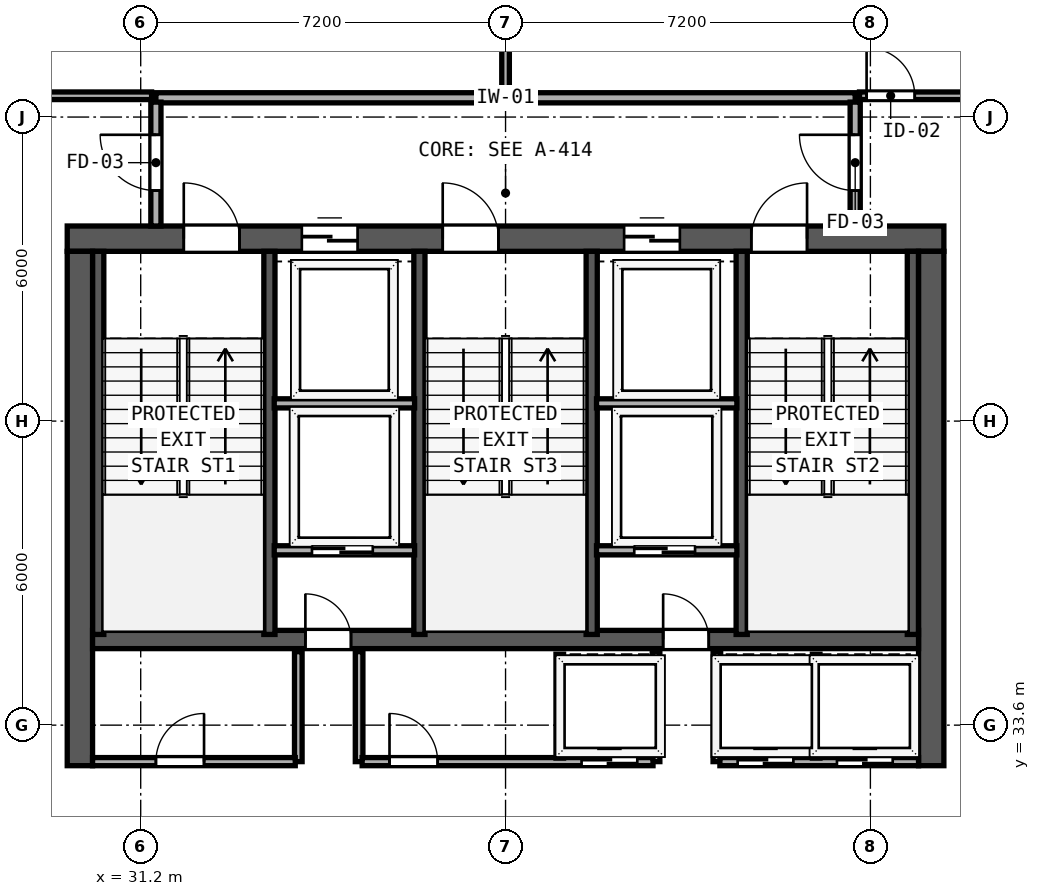
"""IFC4 building model, lengths in metres.
Left out: names, types, materials, properties, quantities, classifications, styles, units other than length and angle.
Written with IfcOpenShell. Run it as: python <this file> out.ifc"""

import sys

from ifc_helpers import new_model, si_unit, direction, frame, frame_2d, origin, place, context, subcontext, project, spatial, rectangle, extrude, element, fill, save


model = new_model("IFC4")
c1 = context("Model", 3, precision=1e-05, world=origin(), true_north=direction((0.0, 1.0)))
c2 = subcontext(c1, "Body", "Model", "MODEL_VIEW")
j1 = project(units=[si_unit("LENGTHUNIT", "METRE"), si_unit("PLANEANGLEUNIT", "RADIAN")], contexts=[c1])
p1 = place(None, origin())
s1 = spatial("IfcSite", under=j1, at=p1, CompositionType="ELEMENT")
p2 = place(p1, origin())
s2 = spatial("IfcBuilding", under=s1, at=p2, CompositionType="ELEMENT")
p3 = place(p2, frame((0.0, 0.0, 282.2)))
s3 = spatial("IfcBuildingStorey", under=s2, at=p3, CompositionType="ELEMENT", Elevation=282.2)
p4 = place(p3, frame((29.75, 43.2, 0.0), z_axis=(0.0, 0.0, 1.0), x_axis=(1.0, 0.0, 0.0)))
e1 = element("IfcWall", 1, at=p4, inside=s3, PredefinedType="SHEAR", context=c2, shape_type="SweptSolid", body=[
    extrude(rectangle(XDim=17.3, YDim=0.5, at=frame_2d((8.65, 0.0))), origin(), (0.0, 0.0, 1.0), 3.72),
])
p5 = place(p4, frame((2.3, 0.0, 0.0)))
e2 = element("IfcOpeningElement", 2, at=p5, cuts=e1, PredefinedType="OPENING", context=c2, shape_type="SweptSolid", body=[
    extrude(rectangle(XDim=1.1, YDim=2.15, at=frame_2d((0.55, 1.075))), frame((0.0, 0.26, 0.0), z_axis=(0.0, -1.0, 0.0), x_axis=(1.0, 0.0, 0.0)), (0.0, 0.0, 1.0), 0.52),
])
p6 = place(p4, frame((7.41, 0.0, 0.0)))
e3 = element("IfcOpeningElement", 3, at=p6, cuts=e1, PredefinedType="OPENING", context=c2, shape_type="SweptSolid", body=[
    extrude(rectangle(XDim=1.1, YDim=2.15, at=frame_2d((0.55, 1.075))), frame((0.0, 0.26, 0.0), z_axis=(0.0, -1.0, 0.0), x_axis=(1.0, 0.0, 0.0)), (0.0, 0.0, 1.0), 0.52),
])
p7 = place(p4, frame((13.5, 0.0, 0.0)))
e4 = element("IfcOpeningElement", 4, at=p7, cuts=e1, PredefinedType="OPENING", context=c2, shape_type="SweptSolid", body=[
    extrude(rectangle(XDim=1.1, YDim=2.15, at=frame_2d((0.55, 1.075))), frame((0.0, 0.26, 0.0), z_axis=(0.0, -1.0, 0.0), x_axis=(1.0, 0.0, 0.0)), (0.0, 0.0, 1.0), 0.52),
])
p8 = place(p4, frame((4.63, 0.0, 0.0)))
e5 = element("IfcOpeningElement", 5, at=p8, cuts=e1, PredefinedType="OPENING", context=c2, shape_type="SweptSolid", body=[
    extrude(rectangle(XDim=1.1, YDim=2.2, at=frame_2d((0.55, 1.1))), frame((0.0, 0.26, 0.0), z_axis=(0.0, -1.0, 0.0), x_axis=(1.0, 0.0, 0.0)), (0.0, 0.0, 1.0), 0.52),
])
p9 = place(p4, frame((10.99, 0.0, 0.0)))
e6 = element("IfcOpeningElement", 6, at=p9, cuts=e1, PredefinedType="OPENING", context=c2, shape_type="SweptSolid", body=[
    extrude(rectangle(XDim=1.1, YDim=2.2, at=frame_2d((0.55, 1.1))), frame((0.0, 0.26, 0.0), z_axis=(0.0, -1.0, 0.0), x_axis=(1.0, 0.0, 0.0)), (0.0, 0.0, 1.0), 0.52),
])
for number, where, z_axis, x_axis in (
    (7, (30.0, 32.8, 0.0), (0.0, 0.0, 1.0), (0.0, 1.0, 0.0)),
    (8, (46.8, 32.8, 0.0), (0.0, 0.0, 1.0), (0.0, 1.0, 0.0)),
):
    element("IfcWall", number, at=place(p3, frame(where, z_axis=z_axis, x_axis=x_axis)), inside=s3, PredefinedType="SHEAR", context=c2, shape_type="SweptSolid", body=[
        extrude(rectangle(XDim=10.15, YDim=0.5, at=frame_2d((5.075, 0.0))), origin(), (0.0, 0.0, 1.0), 3.72),
    ])
p10 = place(p3, frame((30.25, 35.29, 0.0), z_axis=(0.0, 0.0, 1.0), x_axis=(1.0, 0.0, 0.0)))
e9 = element("IfcWall", 9, at=p10, inside=s3, PredefinedType="SHEAR", context=c2, shape_type="SweptSolid", body=[
    extrude(rectangle(XDim=16.3, YDim=0.36, at=frame_2d((8.15, 0.0))), origin(), (0.0, 0.0, 1.0), 3.72),
])
p11 = place(p10, frame((5.1, 0.0, 0.0), z_axis=(0.0, 0.0, 1.0), x_axis=(-1.0, 0.0, 0.0)))
e10 = element("IfcOpeningElement", 10, at=p11, cuts=e9, PredefinedType="OPENING", context=c2, shape_type="SweptSolid", body=[
    extrude(rectangle(XDim=0.9, YDim=2.1, at=frame_2d((0.45, 1.05))), frame((0.0, 0.19, 0.0), z_axis=(0.0, -1.0, 0.0), x_axis=(1.0, 0.0, 0.0)), (0.0, 0.0, 1.0), 0.38),
])
p12 = place(p10, frame((12.16, 0.0, 0.0), z_axis=(0.0, 0.0, 1.0), x_axis=(-1.0, 0.0, 0.0)))
e11 = element("IfcOpeningElement", 11, at=p12, cuts=e9, PredefinedType="OPENING", context=c2, shape_type="SweptSolid", body=[
    extrude(rectangle(XDim=0.9, YDim=2.1, at=frame_2d((0.45, 1.05))), frame((0.0, 0.19, 0.0), z_axis=(0.0, -1.0, 0.0), x_axis=(1.0, 0.0, 0.0)), (0.0, 0.0, 1.0), 0.38),
])
for number, where, z_axis, x_axis in (
    (12, (30.362, 35.39, 0.0), (0.0, 0.0, 1.0), (0.0, 1.0, 0.0)),
    (13, (33.74, 35.39, 0.0), (0.0, 0.0, 1.0), (0.0, 1.0, 0.0)),
    (14, (36.7, 35.39, 0.0), (0.0, 0.0, 1.0), (0.0, 1.0, 0.0)),
    (15, (40.1, 35.39, 0.0), (0.0, 0.0, 1.0), (0.0, 1.0, 0.0)),
    (16, (43.06, 35.39, 0.0), (0.0, 0.0, 1.0), (0.0, 1.0, 0.0)),
    (17, (46.438, 35.39, 0.0), (0.0, 0.0, 1.0), (0.0, 1.0, 0.0)),
):
    element("IfcWall", number, at=place(p3, frame(where, z_axis=z_axis, x_axis=x_axis)), inside=s3, PredefinedType="SHEAR", context=c2, shape_type="SweptSolid", body=[
        extrude(rectangle(XDim=7.56, YDim=0.22, at=frame_2d((3.78, 0.0))), origin(), (0.0, 0.0, 1.0), 3.72),
    ])
p13 = place(p3, frame((31.5, 45.98, 0.0), z_axis=(0.0, 0.0, 1.0), x_axis=(1.0, 0.0, 0.0)))
e18 = element("IfcWall", 18, at=p13, inside=s3, PredefinedType="SOLIDWALL", context=c2, shape_type="SweptSolid", body=[
    extrude(rectangle(XDim=13.8, YDim=0.2, at=frame_2d((6.9, 0.0))), origin(), (0.0, 0.0, 1.0), 3.72),
])
p14 = place(p3, frame((31.5, 43.45, 0.0), z_axis=(0.0, 0.0, 1.0), x_axis=(0.0, 1.0, 0.0)))
e19 = element("IfcWall", 19, at=p14, inside=s3, PredefinedType="SOLIDWALL", context=c2, shape_type="SweptSolid", body=[
    extrude(rectangle(XDim=2.445, YDim=0.2, at=frame_2d((1.223, 0.0))), origin(), (0.0, 0.0, 1.0), 3.72),
])
p15 = place(p14, frame((1.8, 0.0, 0.0), z_axis=(0.0, 0.0, 1.0), x_axis=(-1.0, 0.0, 0.0)))
e20 = element("IfcOpeningElement", 20, at=p15, cuts=e19, PredefinedType="OPENING", context=c2, shape_type="SweptSolid", body=[
    extrude(rectangle(XDim=1.1, YDim=2.15, at=frame_2d((0.55, 1.075))), frame((0.0, 0.11, 0.0), z_axis=(0.0, -1.0, 0.0), x_axis=(1.0, 0.0, 0.0)), (0.0, 0.0, 1.0), 0.22),
])
p16 = place(p3, frame((45.3, 43.45, 0.0), z_axis=(0.0, 0.0, 1.0), x_axis=(0.0, 1.0, 0.0)))
e21 = element("IfcWall", 21, at=p16, inside=s3, PredefinedType="SOLIDWALL", context=c2, shape_type="SweptSolid", body=[
    extrude(rectangle(XDim=2.445, YDim=0.2, at=frame_2d((1.223, 0.0))), origin(), (0.0, 0.0, 1.0), 3.72),
])
p17 = place(p16, frame((0.7, 0.0, 0.0)))
e22 = element("IfcOpeningElement", 22, at=p17, cuts=e21, PredefinedType="OPENING", context=c2, shape_type="SweptSolid", body=[
    extrude(rectangle(XDim=1.1, YDim=2.15, at=frame_2d((0.55, 1.075))), frame((0.0, 0.11, 0.0), z_axis=(0.0, -1.0, 0.0), x_axis=(1.0, 0.0, 0.0)), (0.0, 0.0, 1.0), 0.22),
])
for number, where, z_axis, x_axis in (
    (23, (33.835, 39.95, 0.0), (0.0, 0.0, 1.0), (1.0, 0.0, 0.0)),
    (24, (40.195, 39.95, 0.0), (0.0, 0.0, 1.0), (1.0, 0.0, 0.0)),
):
    element("IfcWall", number, at=place(p3, frame(where, z_axis=z_axis, x_axis=x_axis)), inside=s3, PredefinedType="SOLIDWALL", context=c2, shape_type="SweptSolid", body=[
        extrude(rectangle(XDim=2.77, YDim=0.18, at=frame_2d((1.385, 0.0))), origin(), (0.0, 0.0, 1.0), 3.72),
    ])
p18 = place(p3, frame((33.835, 37.05, 0.0), z_axis=(0.0, 0.0, 1.0), x_axis=(1.0, 0.0, 0.0)))
e25 = element("IfcWall", 25, at=p18, inside=s3, PredefinedType="SOLIDWALL", context=c2, shape_type="SweptSolid", body=[
    extrude(rectangle(XDim=2.77, YDim=0.18, at=frame_2d((1.385, 0.0))), origin(), (0.0, 0.0, 1.0), 3.72),
])
p19 = place(p18, frame((1.945, 0.0, 0.0), z_axis=(0.0, 0.0, 1.0), x_axis=(-1.0, 0.0, 0.0)))
e26 = element("IfcOpeningElement", 26, at=p19, cuts=e25, PredefinedType="OPENING", context=c2, shape_type="SweptSolid", body=[
    extrude(rectangle(XDim=1.2, YDim=2.2, at=frame_2d((0.6, 1.1))), frame((0.0, 0.1, 0.0), z_axis=(0.0, -1.0, 0.0), x_axis=(1.0, 0.0, 0.0)), (0.0, 0.0, 1.0), 0.2),
])
for number, where, z_axis, x_axis in (
    (27, (34.31, 32.88, 0.0), (0.0, 0.0, 1.0), (0.0, 1.0, 0.0)),
    (28, (35.51, 32.88, 0.0), (0.0, 0.0, 1.0), (0.0, 1.0, 0.0)),
):
    element("IfcWall", number, at=place(p3, frame(where, z_axis=z_axis, x_axis=x_axis)), inside=s3, PredefinedType="SOLIDWALL", context=c2, shape_type="SweptSolid", body=[
        extrude(rectangle(XDim=2.17, YDim=0.15, at=frame_2d((1.085, 0.0))), origin(), (0.0, 0.0, 1.0), 3.72),
    ])
p20 = place(p3, frame((40.195, 37.05, 0.0), z_axis=(0.0, 0.0, 1.0), x_axis=(1.0, 0.0, 0.0)))
e29 = element("IfcWall", 29, at=p20, inside=s3, PredefinedType="SOLIDWALL", context=c2, shape_type="SweptSolid", body=[
    extrude(rectangle(XDim=2.77, YDim=0.18, at=frame_2d((1.385, 0.0))), origin(), (0.0, 0.0, 1.0), 3.72),
])
p21 = place(p20, frame((1.945, 0.0, 0.0), z_axis=(0.0, 0.0, 1.0), x_axis=(-1.0, 0.0, 0.0)))
e30 = element("IfcOpeningElement", 30, at=p21, cuts=e29, PredefinedType="OPENING", context=c2, shape_type="SweptSolid", body=[
    extrude(rectangle(XDim=1.2, YDim=2.2, at=frame_2d((0.6, 1.1))), frame((0.0, 0.1, 0.0), z_axis=(0.0, -1.0, 0.0), x_axis=(1.0, 0.0, 0.0)), (0.0, 0.0, 1.0), 0.2),
])
for number, where, z_axis, x_axis in (
    (31, (41.37, 32.88, 0.0), (0.0, 0.0, 1.0), (0.0, 1.0, 0.0)),
    (32, (42.57, 32.88, 0.0), (0.0, 0.0, 1.0), (0.0, 1.0, 0.0)),
):
    element("IfcWall", number, at=place(p3, frame(where, z_axis=z_axis, x_axis=x_axis)), inside=s3, PredefinedType="SOLIDWALL", context=c2, shape_type="SweptSolid", body=[
        extrude(rectangle(XDim=2.17, YDim=0.15, at=frame_2d((1.085, 0.0))), origin(), (0.0, 0.0, 1.0), 3.72),
    ])
p22 = place(p3, frame((30.25, 32.88, 0.0), z_axis=(0.0, 0.0, 1.0), x_axis=(1.0, 0.0, 0.0)))
e33 = element("IfcWall", 33, at=p22, inside=s3, PredefinedType="SOLIDWALL", context=c2, shape_type="SweptSolid", body=[
    extrude(rectangle(XDim=4.0, YDim=0.16, at=frame_2d((2.0, 0.0))), origin(), (0.0, 0.0, 1.0), 3.72),
])
p23 = place(p22, frame((2.2, 0.0, 0.0), z_axis=(0.0, 0.0, 1.0), x_axis=(-1.0, 0.0, 0.0)))
e34 = element("IfcOpeningElement", 34, at=p23, cuts=e33, PredefinedType="OPENING", context=c2, shape_type="SweptSolid", body=[
    extrude(rectangle(XDim=0.95, YDim=2.12, at=frame_2d((0.475, 1.06))), frame((0.0, 0.09, 0.0), z_axis=(0.0, -1.0, 0.0), x_axis=(1.0, 0.0, 0.0)), (0.0, 0.0, 1.0), 0.18),
])
p24 = place(p3, frame((35.57, 32.88, 0.0), z_axis=(0.0, 0.0, 1.0), x_axis=(1.0, 0.0, 0.0)))
e35 = element("IfcWall", 35, at=p24, inside=s3, PredefinedType="SOLIDWALL", context=c2, shape_type="SweptSolid", body=[
    extrude(rectangle(XDim=5.74, YDim=0.16, at=frame_2d((2.87, 0.0))), origin(), (0.0, 0.0, 1.0), 3.72),
])
p25 = place(p24, frame((1.49, 0.0, 0.0), z_axis=(0.0, 0.0, 1.0), x_axis=(-1.0, 0.0, 0.0)))
e36 = element("IfcOpeningElement", 36, at=p25, cuts=e35, PredefinedType="OPENING", context=c2, shape_type="SweptSolid", body=[
    extrude(rectangle(XDim=0.95, YDim=2.12, at=frame_2d((0.475, 1.06))), frame((0.0, 0.09, 0.0), z_axis=(0.0, -1.0, 0.0), x_axis=(1.0, 0.0, 0.0)), (0.0, 0.0, 1.0), 0.18),
])
p26 = place(p24, frame((5.43, 0.0, 0.0), z_axis=(0.0, 0.0, 1.0), x_axis=(-1.0, 0.0, 0.0)))
e37 = element("IfcOpeningElement", 37, at=p26, cuts=e35, PredefinedType="OPENING", context=c2, shape_type="SweptSolid", body=[
    extrude(rectangle(XDim=1.1, YDim=2.2, at=frame_2d((0.55, 1.1))), frame((0.0, 0.09, 0.0), z_axis=(0.0, -1.0, 0.0), x_axis=(1.0, 0.0, 0.0)), (0.0, 0.0, 1.0), 0.18),
])
p27 = place(p3, frame((42.63, 32.88, 0.0), z_axis=(0.0, 0.0, 1.0), x_axis=(1.0, 0.0, 0.0)))
e38 = element("IfcWall", 38, at=p27, inside=s3, PredefinedType="SOLIDWALL", context=c2, shape_type="SweptSolid", body=[
    extrude(rectangle(XDim=3.92, YDim=0.16, at=frame_2d((1.96, 0.0))), origin(), (0.0, 0.0, 1.0), 3.72),
])
p28 = place(p27, frame((1.45, 0.0, 0.0), z_axis=(0.0, 0.0, 1.0), x_axis=(-1.0, 0.0, 0.0)))
e39 = element("IfcOpeningElement", 39, at=p28, cuts=e38, PredefinedType="OPENING", context=c2, shape_type="SweptSolid", body=[
    extrude(rectangle(XDim=1.1, YDim=2.2, at=frame_2d((0.55, 1.1))), frame((0.0, 0.09, 0.0), z_axis=(0.0, -1.0, 0.0), x_axis=(1.0, 0.0, 0.0)), (0.0, 0.0, 1.0), 0.18),
])
p29 = place(p27, frame((3.41, 0.0, 0.0), z_axis=(0.0, 0.0, 1.0), x_axis=(-1.0, 0.0, 0.0)))
e40 = element("IfcOpeningElement", 40, at=p29, cuts=e38, PredefinedType="OPENING", context=c2, shape_type="SweptSolid", body=[
    extrude(rectangle(XDim=1.1, YDim=2.2, at=frame_2d((0.55, 1.1))), frame((0.0, 0.09, 0.0), z_axis=(0.0, -1.0, 0.0), x_axis=(1.0, 0.0, 0.0)), (0.0, 0.0, 1.0), 0.18),
])
for number, where, z_axis, x_axis in (
    (41, (39.47, 32.95, 0.0), (0.0, 0.0, 1.0), (0.0, 1.0, 0.0)),
    (42, (44.53, 32.95, 0.0), (0.0, 0.0, 1.0), (0.0, 1.0, 0.0)),
):
    element("IfcWall", number, at=place(p3, frame(where, z_axis=z_axis, x_axis=x_axis)), inside=s3, PredefinedType="SOLIDWALL", context=c2, shape_type="SweptSolid", body=[
        extrude(rectangle(XDim=2.05, YDim=0.15, at=frame_2d((1.025, 0.0))), origin(), (0.0, 0.0, 1.0), 3.72),
    ])
p30 = place(p3, frame((28.32, 46.02, 0.0), z_axis=(0.0, 0.0, 1.0), x_axis=(1.0, 0.0, 0.0)))
e43 = element("IfcWall", 43, at=p30, inside=s3, PredefinedType="PARTITIONING", context=c2, shape_type="SweptSolid", body=[
    extrude(rectangle(XDim=3.095, YDim=0.15, at=frame_2d((1.547, 0.0))), origin(), (0.0, 0.0, 1.0), 3.72),
])
p31 = place(p30, frame((0.14, 0.0, 0.0)))
e44 = element("IfcOpeningElement", 44, at=p31, cuts=e43, PredefinedType="OPENING", context=c2, shape_type="SweptSolid", body=[
    extrude(rectangle(XDim=0.95, YDim=2.15, at=frame_2d((0.475, 1.075))), frame((0.0, 0.085, 0.0), z_axis=(0.0, -1.0, 0.0), x_axis=(1.0, 0.0, 0.0)), (0.0, 0.0, 1.0), 0.17),
])
p32 = place(p3, frame((38.4, 46.065, 0.0), z_axis=(0.0, 0.0, 1.0), x_axis=(0.0, 1.0, 0.0)))
e45 = element("IfcWall", 45, at=p32, inside=s3, PredefinedType="PARTITIONING", context=c2, shape_type="SweptSolid", body=[
    extrude(rectangle(XDim=6.52, YDim=0.15, at=frame_2d((3.26, 0.0))), origin(), (0.0, 0.0, 1.0), 3.72),
])
p33 = place(p3, frame((45.385, 46.02, 0.0), z_axis=(0.0, 0.0, 1.0), x_axis=(1.0, 0.0, 0.0)))
e46 = element("IfcWall", 46, at=p33, inside=s3, PredefinedType="PARTITIONING", context=c2, shape_type="SweptSolid", body=[
    extrude(rectangle(XDim=3.095, YDim=0.15, at=frame_2d((1.547, 0.0))), origin(), (0.0, 0.0, 1.0), 3.72),
])
p34 = place(p33, frame((0.14, 0.0, 0.0)))
e47 = element("IfcOpeningElement", 47, at=p34, cuts=e46, PredefinedType="OPENING", context=c2, shape_type="SweptSolid", body=[
    extrude(rectangle(XDim=0.95, YDim=2.15, at=frame_2d((0.475, 1.075))), frame((0.0, 0.085, 0.0), z_axis=(0.0, -1.0, 0.0), x_axis=(1.0, 0.0, 0.0)), (0.0, 0.0, 1.0), 0.17),
])
p35 = place(p5, origin())
e48 = element("IfcDoor", 48, at=p35, inside=s3, OperationType="SINGLE_SWING_LEFT", PredefinedType="DOOR", context=c2, shape_type="SweptSolid", body=[
    extrude(rectangle(XDim=1.1, YDim=2.15, at=frame_2d((0.55, 1.075))), frame((0.0, 0.185, 0.0), z_axis=(0.0, -1.0, 0.0), x_axis=(1.0, 0.0, 0.0)), (0.0, 0.0, 1.0), 0.05),
])
fill(e2, e48)
p36 = place(p6, origin())
e49 = element("IfcDoor", 49, at=p36, inside=s3, OperationType="SINGLE_SWING_LEFT", PredefinedType="DOOR", context=c2, shape_type="SweptSolid", body=[
    extrude(rectangle(XDim=1.1, YDim=2.15, at=frame_2d((0.55, 1.075))), frame((0.0, 0.185, 0.0), z_axis=(0.0, -1.0, 0.0), x_axis=(1.0, 0.0, 0.0)), (0.0, 0.0, 1.0), 0.05),
])
fill(e3, e49)
p37 = place(p7, origin())
e50 = element("IfcDoor", 50, at=p37, inside=s3, OperationType="SINGLE_SWING_RIGHT", PredefinedType="DOOR", context=c2, shape_type="SweptSolid", body=[
    extrude(rectangle(XDim=1.1, YDim=2.15, at=frame_2d((0.55, 1.075))), frame((0.0, 0.185, 0.0), z_axis=(0.0, -1.0, 0.0), x_axis=(1.0, 0.0, 0.0)), (0.0, 0.0, 1.0), 0.05),
])
fill(e4, e50)
p38 = place(p15, origin())
e51 = element("IfcDoor", 51, at=p38, inside=s3, OperationType="SINGLE_SWING_LEFT", PredefinedType="DOOR", context=c2, shape_type="SweptSolid", body=[
    extrude(rectangle(XDim=1.1, YDim=2.15, at=frame_2d((0.55, 1.075))), frame((0.0, 0.025, 0.0), z_axis=(0.0, -1.0, 0.0), x_axis=(1.0, 0.0, 0.0)), (0.0, 0.0, 1.0), 0.05),
])
fill(e20, e51)
p39 = place(p17, origin())
e52 = element("IfcDoor", 52, at=p39, inside=s3, OperationType="SINGLE_SWING_RIGHT", PredefinedType="DOOR", context=c2, shape_type="SweptSolid", body=[
    extrude(rectangle(XDim=1.1, YDim=2.15, at=frame_2d((0.55, 1.075))), frame((0.0, 0.025, 0.0), z_axis=(0.0, -1.0, 0.0), x_axis=(1.0, 0.0, 0.0)), (0.0, 0.0, 1.0), 0.05),
])
fill(e22, e52)
p40 = place(p8, origin())
e53 = element("IfcDoor", 53, at=p40, inside=s3, OperationType="SLIDING_TO_LEFT", PredefinedType="DOOR", context=c2, shape_type="SweptSolid", body=[
    extrude(rectangle(XDim=1.1, YDim=2.2, at=frame_2d((0.55, 1.1))), frame((0.0, 0.185, 0.0), z_axis=(0.0, -1.0, 0.0), x_axis=(1.0, 0.0, 0.0)), (0.0, 0.0, 1.0), 0.05),
])
fill(e5, e53)
p41 = place(p9, origin())
e54 = element("IfcDoor", 54, at=p41, inside=s3, OperationType="SLIDING_TO_LEFT", PredefinedType="DOOR", context=c2, shape_type="SweptSolid", body=[
    extrude(rectangle(XDim=1.1, YDim=2.2, at=frame_2d((0.55, 1.1))), frame((0.0, 0.185, 0.0), z_axis=(0.0, -1.0, 0.0), x_axis=(1.0, 0.0, 0.0)), (0.0, 0.0, 1.0), 0.05),
])
fill(e6, e54)
p42 = place(p19, origin())
e55 = element("IfcDoor", 55, at=p42, inside=s3, OperationType="SLIDING_TO_RIGHT", PredefinedType="DOOR", context=c2, shape_type="SweptSolid", body=[
    extrude(rectangle(XDim=1.2, YDim=2.2, at=frame_2d((0.6, 1.1))), frame((0.0, 0.025, 0.0), z_axis=(0.0, -1.0, 0.0), x_axis=(1.0, 0.0, 0.0)), (0.0, 0.0, 1.0), 0.05),
])
fill(e26, e55)
p43 = place(p11, origin())
e56 = element("IfcDoor", 56, at=p43, inside=s3, OperationType="SINGLE_SWING_RIGHT", PredefinedType="DOOR", context=c2, shape_type="SweptSolid", body=[
    extrude(rectangle(XDim=0.9, YDim=2.1, at=frame_2d((0.45, 1.05))), frame((0.0, 0.025, 0.0), z_axis=(0.0, -1.0, 0.0), x_axis=(1.0, 0.0, 0.0)), (0.0, 0.0, 1.0), 0.05),
])
fill(e10, e56)
p44 = place(p21, origin())
e57 = element("IfcDoor", 57, at=p44, inside=s3, OperationType="SLIDING_TO_RIGHT", PredefinedType="DOOR", context=c2, shape_type="SweptSolid", body=[
    extrude(rectangle(XDim=1.2, YDim=2.2, at=frame_2d((0.6, 1.1))), frame((0.0, 0.025, 0.0), z_axis=(0.0, -1.0, 0.0), x_axis=(1.0, 0.0, 0.0)), (0.0, 0.0, 1.0), 0.05),
])
fill(e30, e57)
p45 = place(p12, origin())
e58 = element("IfcDoor", 58, at=p45, inside=s3, OperationType="SINGLE_SWING_RIGHT", PredefinedType="DOOR", context=c2, shape_type="SweptSolid", body=[
    extrude(rectangle(XDim=0.9, YDim=2.1, at=frame_2d((0.45, 1.05))), frame((0.0, 0.025, 0.0), z_axis=(0.0, -1.0, 0.0), x_axis=(1.0, 0.0, 0.0)), (0.0, 0.0, 1.0), 0.05),
])
fill(e11, e58)
p46 = place(p23, origin())
e59 = element("IfcDoor", 59, at=p46, inside=s3, OperationType="SINGLE_SWING_LEFT", PredefinedType="DOOR", context=c2, shape_type="SweptSolid", body=[
    extrude(rectangle(XDim=0.95, YDim=2.12, at=frame_2d((0.475, 1.06))), frame((0.0, 0.025, 0.0), z_axis=(0.0, -1.0, 0.0), x_axis=(1.0, 0.0, 0.0)), (0.0, 0.0, 1.0), 0.05),
])
fill(e34, e59)
p47 = place(p25, origin())
e60 = element("IfcDoor", 60, at=p47, inside=s3, OperationType="SINGLE_SWING_RIGHT", PredefinedType="DOOR", context=c2, shape_type="SweptSolid", body=[
    extrude(rectangle(XDim=0.95, YDim=2.12, at=frame_2d((0.475, 1.06))), frame((0.0, 0.025, 0.0), z_axis=(0.0, -1.0, 0.0), x_axis=(1.0, 0.0, 0.0)), (0.0, 0.0, 1.0), 0.05),
])
fill(e36, e60)
p48 = place(p26, origin())
e61 = element("IfcDoor", 61, at=p48, inside=s3, OperationType="SLIDING_TO_RIGHT", PredefinedType="DOOR", context=c2, shape_type="SweptSolid", body=[
    extrude(rectangle(XDim=1.1, YDim=2.2, at=frame_2d((0.55, 1.1))), frame((0.0, 0.025, 0.0), z_axis=(0.0, -1.0, 0.0), x_axis=(1.0, 0.0, 0.0)), (0.0, 0.0, 1.0), 0.05),
])
fill(e37, e61)
p49 = place(p28, origin())
e62 = element("IfcDoor", 62, at=p49, inside=s3, OperationType="SLIDING_TO_RIGHT", PredefinedType="DOOR", context=c2, shape_type="SweptSolid", body=[
    extrude(rectangle(XDim=1.1, YDim=2.2, at=frame_2d((0.55, 1.1))), frame((0.0, 0.025, 0.0), z_axis=(0.0, -1.0, 0.0), x_axis=(1.0, 0.0, 0.0)), (0.0, 0.0, 1.0), 0.05),
])
fill(e39, e62)
p50 = place(p29, origin())
e63 = element("IfcDoor", 63, at=p50, inside=s3, OperationType="SLIDING_TO_RIGHT", PredefinedType="DOOR", context=c2, shape_type="SweptSolid", body=[
    extrude(rectangle(XDim=1.1, YDim=2.2, at=frame_2d((0.55, 1.1))), frame((0.0, 0.025, 0.0), z_axis=(0.0, -1.0, 0.0), x_axis=(1.0, 0.0, 0.0)), (0.0, 0.0, 1.0), 0.05),
])
fill(e40, e63)
p51 = place(p34, origin())
e64 = element("IfcDoor", 64, at=p51, inside=s3, OperationType="SINGLE_SWING_LEFT", PredefinedType="DOOR", context=c2, shape_type="SweptSolid", body=[
    extrude(rectangle(XDim=0.95, YDim=2.15, at=frame_2d((0.475, 1.075))), frame((0.0, 0.025, 0.0), z_axis=(0.0, -1.0, 0.0), x_axis=(1.0, 0.0, 0.0)), (0.0, 0.0, 1.0), 0.05),
])
fill(e47, e64)
save(model, sys.argv[1])
